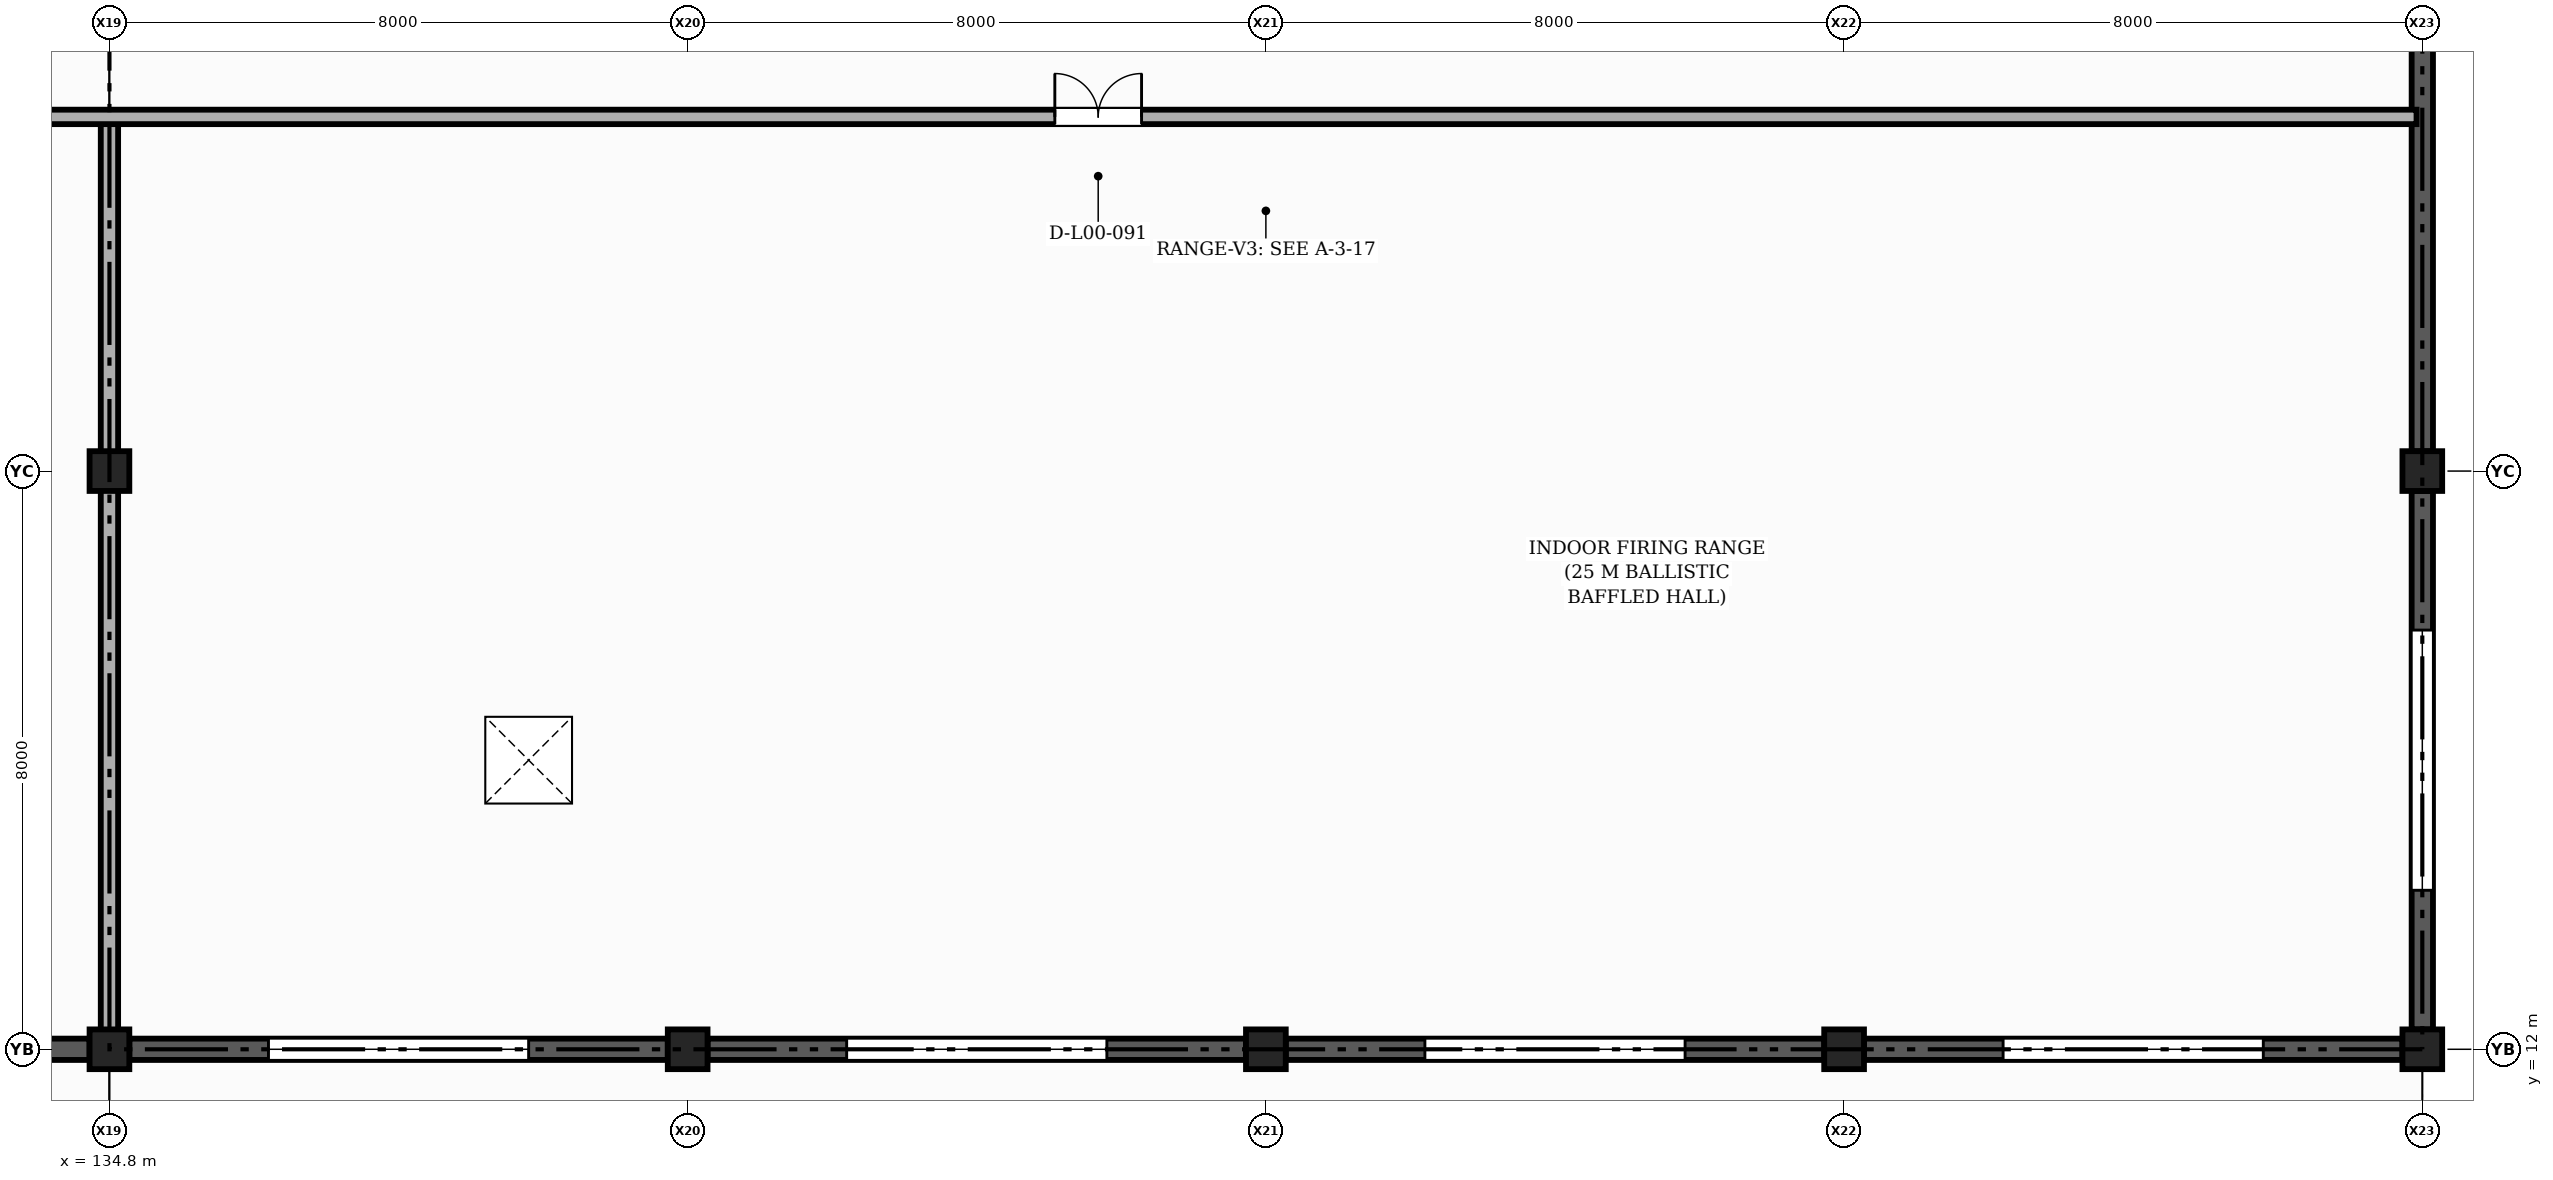
"""IFC4 building model, lengths in metres.
Left out: names, types, materials, properties, quantities, classifications, styles, units other than length and angle.
Written with IfcOpenShell. Run it as: python <this file> out.ifc"""

import sys

from ifc_helpers import new_model, si_unit, direction, frame, frame_2d, origin, origin_2d, place, context, subcontext, project, spatial, rectangle, extrude, element, fill, save


model = new_model("IFC4")
c1 = context("Model", 3, precision=1e-05, world=origin(), true_north=direction((0.0, 1.0)))
c2 = subcontext(c1, "Body", "Model", "MODEL_VIEW")
j1 = project(units=[si_unit("LENGTHUNIT", "METRE"), si_unit("PLANEANGLEUNIT", "RADIAN")], contexts=[c1])
p1 = place(None, origin())
s1 = spatial("IfcSite", under=j1, at=p1, CompositionType="ELEMENT")
p2 = place(p1, origin())
s2 = spatial("IfcBuilding", under=s1, at=p2, CompositionType="ELEMENT")
p3 = place(p2, origin())
s3 = spatial("IfcBuildingStorey", under=s2, at=p3, CompositionType="ELEMENT", Elevation=0.0)
for number, where, z_axis, x_axis in (
    (1, (134.8, 12.0, -0.5), (0.0, 0.0, 1.0), (1.0, 0.0, 0.0)),
    (2, (134.8, 20.0, -0.5), (0.0, 0.0, 1.0), (1.0, 0.0, 0.0)),
    (3, (142.8, 12.0, -0.5), (0.0, 0.0, 1.0), (1.0, 0.0, 0.0)),
    (4, (150.8, 12.0, -0.5), (0.0, 0.0, 1.0), (1.0, 0.0, 0.0)),
    (5, (158.8, 12.0, -0.5), (0.0, 0.0, 1.0), (1.0, 0.0, 0.0)),
    (6, (166.8, 12.0, -0.5), (0.0, 0.0, 1.0), (1.0, 0.0, 0.0)),
    (7, (166.8, 20.0, -0.5), (0.0, 0.0, 1.0), (1.0, 0.0, 0.0)),
):
    element("IfcColumn", number, at=place(p3, frame(where, z_axis=z_axis, x_axis=x_axis)), inside=s3, PredefinedType="COLUMN", context=c2, shape_type="SweptSolid", body=[
        extrude(rectangle(XDim=0.55, YDim=0.55, at=origin_2d()), origin(), (0.0, 0.0, 1.0), 5.3),
    ])
p4 = place(p3, frame((127.075, 12.0, -0.42), z_axis=(0.0, 0.0, 1.0), x_axis=(1.0, 0.0, 0.0)))
e8 = element("IfcWall", 8, at=p4, inside=s3, PredefinedType="SOLIDWALL", context=c2, shape_type="SweptSolid", body=[
    extrude(rectangle(XDim=7.45, YDim=0.295, at=frame_2d((3.725, 0.0))), origin(), (0.0, 0.0, 1.0), 4.333),
])
p5 = place(p4, frame((1.925, 0.0, 2.47)))
e9 = element("IfcOpeningElement", 9, at=p5, cuts=e8, PredefinedType="OPENING", context=c2, shape_type="SweptSolid", body=[
    extrude(rectangle(XDim=3.6, YDim=1.2, at=frame_2d((1.8, 0.6))), frame((0.0, 0.157, 0.0), z_axis=(0.0, -1.0, 0.0), x_axis=(1.0, 0.0, 0.0)), (0.0, 0.0, 1.0), 0.315),
])
p6 = place(p3, frame((135.075, 12.0, -0.42), z_axis=(0.0, 0.0, 1.0), x_axis=(1.0, 0.0, 0.0)))
e10 = element("IfcWall", 10, at=p6, inside=s3, PredefinedType="SOLIDWALL", context=c2, shape_type="SweptSolid", body=[
    extrude(rectangle(XDim=7.45, YDim=0.295, at=frame_2d((3.725, 0.0))), origin(), (0.0, 0.0, 1.0), 4.333),
])
p7 = place(p6, frame((1.925, 0.0, 2.47)))
e11 = element("IfcOpeningElement", 11, at=p7, cuts=e10, PredefinedType="OPENING", context=c2, shape_type="SweptSolid", body=[
    extrude(rectangle(XDim=3.6, YDim=1.2, at=frame_2d((1.8, 0.6))), frame((0.0, 0.157, 0.0), z_axis=(0.0, -1.0, 0.0), x_axis=(1.0, 0.0, 0.0)), (0.0, 0.0, 1.0), 0.315),
])
p8 = place(p3, frame((143.075, 12.0, -0.42), z_axis=(0.0, 0.0, 1.0), x_axis=(1.0, 0.0, 0.0)))
e12 = element("IfcWall", 12, at=p8, inside=s3, PredefinedType="SOLIDWALL", context=c2, shape_type="SweptSolid", body=[
    extrude(rectangle(XDim=7.45, YDim=0.295, at=frame_2d((3.725, 0.0))), origin(), (0.0, 0.0, 1.0), 4.333),
])
p9 = place(p8, frame((1.925, 0.0, 2.47)))
e13 = element("IfcOpeningElement", 13, at=p9, cuts=e12, PredefinedType="OPENING", context=c2, shape_type="SweptSolid", body=[
    extrude(rectangle(XDim=3.6, YDim=1.2, at=frame_2d((1.8, 0.6))), frame((0.0, 0.157, 0.0), z_axis=(0.0, -1.0, 0.0), x_axis=(1.0, 0.0, 0.0)), (0.0, 0.0, 1.0), 0.315),
])
p10 = place(p3, frame((151.075, 12.0, -0.42), z_axis=(0.0, 0.0, 1.0), x_axis=(1.0, 0.0, 0.0)))
e14 = element("IfcWall", 14, at=p10, inside=s3, PredefinedType="SOLIDWALL", context=c2, shape_type="SweptSolid", body=[
    extrude(rectangle(XDim=7.45, YDim=0.295, at=frame_2d((3.725, 0.0))), origin(), (0.0, 0.0, 1.0), 4.333),
])
p11 = place(p10, frame((1.925, 0.0, 2.47)))
e15 = element("IfcOpeningElement", 15, at=p11, cuts=e14, PredefinedType="OPENING", context=c2, shape_type="SweptSolid", body=[
    extrude(rectangle(XDim=3.6, YDim=1.2, at=frame_2d((1.8, 0.6))), frame((0.0, 0.157, 0.0), z_axis=(0.0, -1.0, 0.0), x_axis=(1.0, 0.0, 0.0)), (0.0, 0.0, 1.0), 0.315),
])
p12 = place(p3, frame((159.075, 12.0, -0.42), z_axis=(0.0, 0.0, 1.0), x_axis=(1.0, 0.0, 0.0)))
e16 = element("IfcWall", 16, at=p12, inside=s3, PredefinedType="SOLIDWALL", context=c2, shape_type="SweptSolid", body=[
    extrude(rectangle(XDim=7.45, YDim=0.295, at=frame_2d((3.725, 0.0))), origin(), (0.0, 0.0, 1.0), 4.333),
])
p13 = place(p12, frame((1.925, 0.0, 2.47)))
e17 = element("IfcOpeningElement", 17, at=p13, cuts=e16, PredefinedType="OPENING", context=c2, shape_type="SweptSolid", body=[
    extrude(rectangle(XDim=3.6, YDim=1.2, at=frame_2d((1.8, 0.6))), frame((0.0, 0.157, 0.0), z_axis=(0.0, -1.0, 0.0), x_axis=(1.0, 0.0, 0.0)), (0.0, 0.0, 1.0), 0.315),
])
p14 = place(p3, frame((166.8, 12.275, -0.42), z_axis=(0.0, 0.0, 1.0), x_axis=(0.0, 1.0, 0.0)))
e18 = element("IfcWall", 18, at=p14, inside=s3, PredefinedType="SOLIDWALL", context=c2, shape_type="SweptSolid", body=[
    extrude(rectangle(XDim=7.45, YDim=0.295, at=frame_2d((3.725, 0.0))), origin(), (0.0, 0.0, 1.0), 4.488),
])
p15 = place(p14, frame((1.925, 0.0, 2.47)))
e19 = element("IfcOpeningElement", 19, at=p15, cuts=e18, PredefinedType="OPENING", context=c2, shape_type="SweptSolid", body=[
    extrude(rectangle(XDim=3.6, YDim=1.2, at=frame_2d((1.8, 0.6))), frame((0.0, 0.157, 0.0), z_axis=(0.0, -1.0, 0.0), x_axis=(1.0, 0.0, 0.0)), (0.0, 0.0, 1.0), 0.315),
])
p16 = place(p3, frame((166.8, 20.275, -0.42), z_axis=(0.0, 0.0, 1.0), x_axis=(0.0, 1.0, 0.0)))
e20 = element("IfcWall", 20, at=p16, inside=s3, PredefinedType="SOLIDWALL", context=c2, shape_type="SweptSolid", body=[
    extrude(rectangle(XDim=7.45, YDim=0.295, at=frame_2d((3.725, 0.0))), origin(), (0.0, 0.0, 1.0), 4.488),
])
p17 = place(p3, frame((134.8, 12.08, 0.0), z_axis=(0.0, 0.0, 1.0), x_axis=(0.0, 1.0, 0.0)))
e21 = element("IfcWall", 21, at=p17, inside=s3, PredefinedType="PARTITIONING", context=c2, shape_type="SweptSolid", body=[
    extrude(rectangle(XDim=12.82, YDim=0.24, at=frame_2d((6.41, 0.0))), origin(), (0.0, 0.0, 1.0), 3.898),
])
p18 = place(p3, frame((102.88, 24.9, 0.0), z_axis=(0.0, 0.0, 1.0), x_axis=(1.0, 0.0, 0.0)))
e22 = element("IfcWall", 22, at=p18, inside=s3, PredefinedType="PARTITIONING", context=c2, shape_type="SweptSolid", body=[
    extrude(rectangle(XDim=63.84, YDim=0.2, at=frame_2d((31.92, 0.0))), origin(), (0.0, 0.0, 1.0), 3.646),
])
p19 = place(p18, frame((3.5, 0.0, 0.0)))
e23 = element("IfcOpeningElement", 23, at=p19, cuts=e22, PredefinedType="OPENING", context=c2, shape_type="SweptSolid", body=[
    extrude(rectangle(XDim=0.95, YDim=2.15, at=frame_2d((0.475, 1.075))), frame((0.0, 0.11, 0.0), z_axis=(0.0, -1.0, 0.0), x_axis=(1.0, 0.0, 0.0)), (0.0, 0.0, 1.0), 0.22),
])
p20 = place(p18, frame((19.0, 0.0, 0.0)))
e24 = element("IfcOpeningElement", 24, at=p20, cuts=e22, PredefinedType="OPENING", context=c2, shape_type="SweptSolid", body=[
    extrude(rectangle(XDim=1.5, YDim=2.15, at=frame_2d((0.75, 1.075))), frame((0.0, 0.11, 0.0), z_axis=(0.0, -1.0, 0.0), x_axis=(1.0, 0.0, 0.0)), (0.0, 0.0, 1.0), 0.22),
])
p21 = place(p18, frame((45.0, 0.0, 0.0)))
e25 = element("IfcOpeningElement", 25, at=p21, cuts=e22, PredefinedType="OPENING", context=c2, shape_type="SweptSolid", body=[
    extrude(rectangle(XDim=1.2, YDim=2.15, at=frame_2d((0.6, 1.075))), frame((0.0, 0.11, 0.0), z_axis=(0.0, -1.0, 0.0), x_axis=(1.0, 0.0, 0.0)), (0.0, 0.0, 1.0), 0.22),
])
p22 = place(p7, origin())
e26 = element("IfcWindow", 26, at=p22, inside=s3, PartitioningType="SINGLE_PANEL", PredefinedType="WINDOW", context=c2, shape_type="SweptSolid", body=[
    extrude(rectangle(XDim=3.6, YDim=1.2, at=frame_2d((1.8, 0.6))), frame((0.0, 0.03, 0.0), z_axis=(0.0, -1.0, 0.0), x_axis=(1.0, 0.0, 0.0)), (0.0, 0.0, 1.0), 0.06),
])
fill(e11, e26)
p23 = place(p9, origin())
e27 = element("IfcWindow", 27, at=p23, inside=s3, PartitioningType="SINGLE_PANEL", PredefinedType="WINDOW", context=c2, shape_type="SweptSolid", body=[
    extrude(rectangle(XDim=3.6, YDim=1.2, at=frame_2d((1.8, 0.6))), frame((0.0, 0.03, 0.0), z_axis=(0.0, -1.0, 0.0), x_axis=(1.0, 0.0, 0.0)), (0.0, 0.0, 1.0), 0.06),
])
fill(e13, e27)
p24 = place(p11, origin())
e28 = element("IfcWindow", 28, at=p24, inside=s3, PartitioningType="SINGLE_PANEL", PredefinedType="WINDOW", context=c2, shape_type="SweptSolid", body=[
    extrude(rectangle(XDim=3.6, YDim=1.2, at=frame_2d((1.8, 0.6))), frame((0.0, 0.03, 0.0), z_axis=(0.0, -1.0, 0.0), x_axis=(1.0, 0.0, 0.0)), (0.0, 0.0, 1.0), 0.06),
])
fill(e15, e28)
p25 = place(p13, origin())
e29 = element("IfcWindow", 29, at=p25, inside=s3, PartitioningType="SINGLE_PANEL", PredefinedType="WINDOW", context=c2, shape_type="SweptSolid", body=[
    extrude(rectangle(XDim=3.6, YDim=1.2, at=frame_2d((1.8, 0.6))), frame((0.0, 0.03, 0.0), z_axis=(0.0, -1.0, 0.0), x_axis=(1.0, 0.0, 0.0)), (0.0, 0.0, 1.0), 0.06),
])
fill(e17, e29)
p26 = place(p15, origin())
e30 = element("IfcWindow", 30, at=p26, inside=s3, PartitioningType="SINGLE_PANEL", PredefinedType="WINDOW", context=c2, shape_type="SweptSolid", body=[
    extrude(rectangle(XDim=3.6, YDim=1.2, at=frame_2d((1.8, 0.6))), frame((0.0, 0.03, 0.0), z_axis=(0.0, -1.0, 0.0), x_axis=(1.0, 0.0, 0.0)), (0.0, 0.0, 1.0), 0.06),
])
fill(e19, e30)
p27 = place(p21, origin())
e31 = element("IfcDoor", 31, at=p27, inside=s3, OperationType="DOUBLE_DOOR_SINGLE_SWING", PredefinedType="DOOR", context=c2, shape_type="SweptSolid", body=[
    extrude(rectangle(XDim=1.2, YDim=2.15, at=frame_2d((0.6, 1.075))), frame((0.0, 0.025, 0.0), z_axis=(0.0, -1.0, 0.0), x_axis=(1.0, 0.0, 0.0)), (0.0, 0.0, 1.0), 0.05),
])
fill(e25, e31)
save(model, sys.argv[1])
